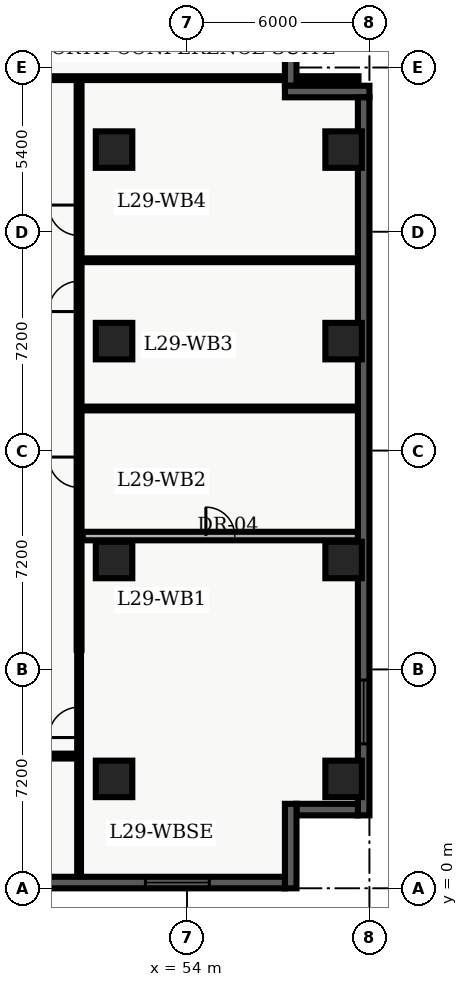
"""IFC4 building model, lengths in metres.
Left out: names, types, materials, properties, quantities, classifications, styles, units other than length and angle.
Written with IfcOpenShell. Run it as: python <this file> out.ifc"""

import sys

from ifc_helpers import new_model, entity, si_unit, converted_unit, direction, frame, origin_with_axes, origin_2d_with_axis, place, context, subcontext, project, spatial, polyline, rectangle, outline, extrude, element, fill, save


model = new_model("IFC4")
c1 = context("Model", 3, precision=1e-05, world=origin_with_axes(), true_north=direction((0.0, 1.0)))
c2 = subcontext(c1, "Body", "Model", "MODEL_VIEW")
j1 = project(units=[si_unit("LENGTHUNIT", "METRE"), converted_unit("PLANEANGLEUNIT", "DEGREE", entity("IfcPlaneAngleMeasure", 0.017), si_unit("PLANEANGLEUNIT", "RADIAN"), dimensions=[0, 0, 0, 0, 0, 0, 0])], contexts=[c1])
p1 = place(None, origin_with_axes())
s1 = spatial("IfcSite", under=j1, at=p1, CompositionType="ELEMENT")
p2 = place(p1, origin_with_axes())
s2 = spatial("IfcBuilding", under=s1, at=p2, CompositionType="ELEMENT")
p3 = place(p2, frame((0.0, 0.0, 120.3), z_axis=(0.0, 0.0, 1.0), x_axis=(1.0, 0.0, 0.0)))
s3 = spatial("IfcBuildingStorey", under=s2, at=p3, CompositionType="ELEMENT", Elevation=120.3)
for number, where, z_axis, x_axis in (
    (1, (51.6, 3.6, 0.0), (0.0, 0.0, 1.0), (1.0, 0.0, 0.0)),
    (2, (51.6, 10.8, 0.0), (0.0, 0.0, 1.0), (1.0, 0.0, 0.0)),
    (3, (51.6, 18.0, 0.0), (0.0, 0.0, 1.0), (1.0, 0.0, 0.0)),
    (4, (51.6, 24.3, 0.0), (0.0, 0.0, 1.0), (1.0, 0.0, 0.0)),
    (5, (59.15, 3.6, 0.0), (0.0, 0.0, 1.0), (1.0, 0.0, 0.0)),
    (6, (59.15, 10.8, 0.0), (0.0, 0.0, 1.0), (1.0, 0.0, 0.0)),
    (7, (59.15, 18.0, 0.0), (0.0, 0.0, 1.0), (1.0, 0.0, 0.0)),
    (8, (59.15, 24.3, 0.0), (0.0, 0.0, 1.0), (1.0, 0.0, 0.0)),
):
    element("IfcColumn", number, at=place(p3, frame(where, z_axis=z_axis, x_axis=x_axis)), inside=s3, PredefinedType="COLUMN", context=c2, shape_type="SweptSolid", body=[
        extrude(rectangle(XDim=1.2, YDim=1.2, at=origin_2d_with_axis()), origin_with_axes(), (0.0, 0.0, 1.0), 3.9),
    ])
p4 = place(p3, frame((50.45, 7.85, 0.0), z_axis=(0.0, 0.0, 1.0), x_axis=(0.0, 1.0, 0.0)))
e9 = element("IfcWall", 9, at=p4, inside=s3, PredefinedType="PARTITIONING", context=c2, shape_type="SweptSolid", body=[
    extrude(outline(polyline([(0.0, -0.08), (18.8, -0.08), (18.8, 0.08), (0.0, 0.08), (0.0, -0.08)])), origin_with_axes(), (0.0, 0.0, 1.0), 2.64),
])
p5 = place(p4, frame((5.836, 0.0, 0.0), z_axis=(0.0, 0.0, 1.0), x_axis=(1.0, 0.0, 0.0)))
e10 = element("IfcOpeningElement", 10, at=p5, cuts=e9, PredefinedType="OPENING", context=c2, shape_type="SweptSolid", body=[
    extrude(rectangle(XDim=1.0, YDim=0.18, at=origin_2d_with_axis()), origin_with_axes(), (0.0, 0.0, 1.0), 2.15),
])
p6 = place(p4, frame((11.622, 0.0, 0.0), z_axis=(0.0, 0.0, 1.0), x_axis=(1.0, 0.0, 0.0)))
e11 = element("IfcOpeningElement", 11, at=p6, cuts=e9, PredefinedType="OPENING", context=c2, shape_type="SweptSolid", body=[
    extrude(rectangle(XDim=1.0, YDim=0.18, at=origin_2d_with_axis()), origin_with_axes(), (0.0, 0.0, 1.0), 2.15),
])
p7 = place(p4, frame((14.125, 0.0, 0.0), z_axis=(0.0, 0.0, 1.0), x_axis=(1.0, 0.0, 0.0)))
e12 = element("IfcOpeningElement", 12, at=p7, cuts=e9, PredefinedType="OPENING", context=c2, shape_type="SweptSolid", body=[
    extrude(rectangle(XDim=1.0, YDim=0.18, at=origin_2d_with_axis()), origin_with_axes(), (0.0, 0.0, 1.0), 2.15),
])
p8 = place(p3, frame((38.76, 26.65, 0.0), z_axis=(0.0, 0.0, 1.0), x_axis=(1.0, 0.0, 0.0)))
e13 = element("IfcWall", 13, at=p8, inside=s3, PredefinedType="PARTITIONING", context=c2, shape_type="SweptSolid", body=[
    extrude(outline(polyline([(0.0, -0.062), (20.88, -0.062), (20.88, 0.062), (0.0, 0.062), (0.0, -0.062)])), origin_with_axes(), (0.0, 0.0, 1.0), 2.64),
])
p9 = place(p8, frame((4.24, 0.0, 0.0), z_axis=(0.0, 0.0, 1.0), x_axis=(1.0, 0.0, 0.0)))
e14 = element("IfcOpeningElement", 14, at=p9, cuts=e13, PredefinedType="OPENING", context=c2, shape_type="SweptSolid", body=[
    extrude(rectangle(XDim=1.0, YDim=0.145, at=origin_2d_with_axis()), origin_with_axes(), (0.0, 0.0, 1.0), 2.15),
])
p10 = place(p3, frame((44.55, 4.35, 0.0), z_axis=(0.0, 0.0, 1.0), x_axis=(1.0, 0.0, 0.0)))
e15 = element("IfcWall", 15, at=p10, inside=s3, PredefinedType="PARTITIONING", context=c2, shape_type="SweptSolid", body=[
    extrude(outline(polyline([(0.0, -0.08), (5.9, -0.08), (5.9, 0.08), (0.0, 0.08), (0.0, -0.08)])), origin_with_axes(), (0.0, 0.0, 1.0), 2.64),
])
p11 = place(p10, frame((1.7, 0.0, 0.0), z_axis=(0.0, 0.0, 1.0), x_axis=(1.0, 0.0, 0.0)))
e16 = element("IfcOpeningElement", 16, at=p11, cuts=e15, PredefinedType="OPENING", context=c2, shape_type="SweptSolid", body=[
    extrude(rectangle(XDim=1.0, YDim=0.18, at=origin_2d_with_axis()), origin_with_axes(), (0.0, 0.0, 1.0), 2.15),
])
p12 = place(p3, frame((50.45, 0.36, 0.0), z_axis=(0.0, 0.0, 1.0), x_axis=(0.0, 1.0, 0.0)))
e17 = element("IfcWall", 17, at=p12, inside=s3, PredefinedType="PARTITIONING", context=c2, shape_type="SweptSolid", body=[
    extrude(outline(polyline([(0.0, -0.062), (7.49, -0.062), (7.49, 0.062), (0.0, 0.062), (0.0, -0.062)])), origin_with_axes(), (0.0, 0.0, 1.0), 2.64),
])
p13 = place(p12, frame((5.1, 0.0, 0.0), z_axis=(0.0, 0.0, 1.0), x_axis=(1.0, 0.0, 0.0)))
e18 = element("IfcOpeningElement", 18, at=p13, cuts=e17, PredefinedType="OPENING", context=c2, shape_type="SweptSolid", body=[
    extrude(rectangle(XDim=1.0, YDim=0.145, at=origin_2d_with_axis()), origin_with_axes(), (0.0, 0.0, 1.0), 2.15),
])
p14 = place(p3, frame((50.57, 11.588, 0.0), z_axis=(0.0, 0.0, 1.0), x_axis=(1.0, 0.0, 0.0)))
e19 = element("IfcWall", 19, at=p14, inside=s3, PredefinedType="PARTITIONING", context=c2, shape_type="SweptSolid", body=[
    extrude(outline(polyline([(0.0, -0.14), (9.055, -0.14), (9.055, 0.14), (0.0, 0.14), (0.0, -0.14)])), origin_with_axes(), (0.0, 0.0, 1.0), 2.64),
])
p15 = place(p14, frame((4.525, 0.0, 0.0), z_axis=(0.0, 0.0, 1.0), x_axis=(1.0, 0.0, 0.0)))
e20 = element("IfcOpeningElement", 20, at=p15, cuts=e19, PredefinedType="OPENING", context=c2, shape_type="SweptSolid", body=[
    extrude(rectangle(XDim=0.95, YDim=0.3, at=origin_2d_with_axis()), origin_with_axes(), (0.0, 0.0, 1.0), 2.15),
])
for number, where, z_axis, x_axis in (
    (21, (50.57, 15.784, 0.0), (0.0, 0.0, 1.0), (1.0, 0.0, 0.0)),
    (22, (50.57, 20.66, 0.0), (0.0, 0.0, 1.0), (1.0, 0.0, 0.0)),
):
    element("IfcWall", number, at=place(p3, frame(where, z_axis=z_axis, x_axis=x_axis)), inside=s3, PredefinedType="PARTITIONING", context=c2, shape_type="SweptSolid", body=[
        extrude(outline(polyline([(0.0, -0.062), (9.055, -0.062), (9.055, 0.062), (0.0, 0.062), (0.0, -0.062)])), origin_with_axes(), (0.0, 0.0, 1.0), 2.64),
    ])
p16 = place(p3, frame((57.41, 28.42, 0.0), z_axis=(0.0, 0.0, 1.0), x_axis=(0.0, -1.0, 0.0)))
e23 = element("IfcWall", 23, at=p16, inside=s3, PredefinedType="SOLIDWALL", context=c2, shape_type="SweptSolid", body=[
    extrude(outline(polyline([(0.0, -0.19), (2.02, -0.19), (2.02, 0.19), (0.0, 0.19), (0.0, -0.19)])), origin_with_axes(), (0.0, 0.0, 1.0), 3.6),
])
p17 = place(p3, frame((57.22, 26.21, 0.0), z_axis=(0.0, 0.0, 1.0), x_axis=(1.0, 0.0, 0.0)))
e24 = element("IfcWall", 24, at=p17, inside=s3, PredefinedType="SOLIDWALL", context=c2, shape_type="SweptSolid", body=[
    extrude(outline(polyline([(0.0, -0.19), (2.78, -0.19), (2.78, 0.19), (0.0, 0.19), (0.0, -0.19)])), origin_with_axes(), (0.0, 0.0, 1.0), 3.6),
])
p18 = place(p3, frame((59.81, 26.02, 0.0), z_axis=(0.0, 0.0, 1.0), x_axis=(0.0, -1.0, 0.0)))
e25 = element("IfcWall", 25, at=p18, inside=s3, PredefinedType="SOLIDWALL", context=c2, shape_type="SweptSolid", body=[
    extrude(outline(polyline([(0.0, -0.19), (23.62, -0.19), (23.62, 0.19), (0.0, 0.19), (0.0, -0.19)])), origin_with_axes(), (0.0, 0.0, 1.0), 3.6),
])
p19 = place(p18, frame((20.218, 0.0, 0.45), z_axis=(0.0, 0.0, 1.0), x_axis=(1.0, 0.0, 0.0)))
e26 = element("IfcOpeningElement", 26, at=p19, cuts=e25, PredefinedType="OPENING", context=c2, shape_type="SweptSolid", body=[
    extrude(rectangle(XDim=2.1, YDim=0.4, at=origin_2d_with_axis()), origin_with_axes(), (0.0, 0.0, 1.0), 2.2),
])
p20 = place(p3, frame((59.62, 2.59, 0.0), z_axis=(0.0, 0.0, 1.0), x_axis=(-1.0, 0.0, 0.0)))
e27 = element("IfcWall", 27, at=p20, inside=s3, PredefinedType="SOLIDWALL", context=c2, shape_type="SweptSolid", body=[
    extrude(outline(polyline([(0.0, -0.19), (2.02, -0.19), (2.02, 0.19), (0.0, 0.19), (0.0, -0.19)])), origin_with_axes(), (0.0, 0.0, 1.0), 3.6),
])
p21 = place(p3, frame((57.41, 2.78, 0.0), z_axis=(0.0, 0.0, 1.0), x_axis=(0.0, -1.0, 0.0)))
e28 = element("IfcWall", 28, at=p21, inside=s3, PredefinedType="SOLIDWALL", context=c2, shape_type="SweptSolid", body=[
    extrude(outline(polyline([(0.0, -0.19), (2.78, -0.19), (2.78, 0.19), (0.0, 0.19), (0.0, -0.19)])), origin_with_axes(), (0.0, 0.0, 1.0), 3.6),
])
p22 = place(p3, frame((57.22, 0.19, 0.0), z_axis=(0.0, 0.0, 1.0), x_axis=(-1.0, 0.0, 0.0)))
e29 = element("IfcWall", 29, at=p22, inside=s3, PredefinedType="SOLIDWALL", context=c2, shape_type="SweptSolid", body=[
    extrude(outline(polyline([(0.0, -0.19), (18.82, -0.19), (18.82, 0.19), (0.0, 0.19), (0.0, -0.19)])), origin_with_axes(), (0.0, 0.0, 1.0), 3.6),
])
p23 = place(p22, frame((3.537, 0.0, 0.45), z_axis=(0.0, 0.0, 1.0), x_axis=(1.0, 0.0, 0.0)))
e30 = element("IfcOpeningElement", 30, at=p23, cuts=e29, PredefinedType="OPENING", context=c2, shape_type="SweptSolid", body=[
    extrude(rectangle(XDim=2.1, YDim=0.4, at=origin_2d_with_axis()), origin_with_axes(), (0.0, 0.0, 1.0), 2.2),
])
p24 = place(p22, frame((9.41, 0.0, 0.45), z_axis=(0.0, 0.0, 1.0), x_axis=(1.0, 0.0, 0.0)))
e31 = element("IfcOpeningElement", 31, at=p24, cuts=e29, PredefinedType="OPENING", context=c2, shape_type="SweptSolid", body=[
    extrude(rectangle(XDim=2.1, YDim=0.4, at=origin_2d_with_axis()), origin_with_axes(), (0.0, 0.0, 1.0), 2.2),
])
p25 = place(p22, frame((15.283, 0.0, 0.45), z_axis=(0.0, 0.0, 1.0), x_axis=(1.0, 0.0, 0.0)))
e32 = element("IfcOpeningElement", 32, at=p25, cuts=e29, PredefinedType="OPENING", context=c2, shape_type="SweptSolid", body=[
    extrude(rectangle(XDim=2.1, YDim=0.4, at=origin_2d_with_axis()), origin_with_axes(), (0.0, 0.0, 1.0), 2.2),
])
p26 = place(p12, frame((5.1, 0.0, 0.0), z_axis=(0.0, 0.0, 1.0), x_axis=(1.0, 0.0, 0.0)))
e33 = element("IfcDoor", 33, at=p26, inside=s3, OperationType="SINGLE_SWING_LEFT", PredefinedType="DOOR", context=c2, shape_type="SweptSolid", body=[
    extrude(rectangle(XDim=1.0, YDim=0.075, at=origin_2d_with_axis()), origin_with_axes(), (0.0, 0.0, 1.0), 2.15),
])
fill(e18, e33)
p27 = place(p14, frame((4.525, 0.0, 0.0), z_axis=(0.0, 0.0, 1.0), x_axis=(1.0, 0.0, 0.0)))
e34 = element("IfcDoor", 34, at=p27, inside=s3, OperationType="SINGLE_SWING_LEFT", PredefinedType="DOOR", context=c2, shape_type="SweptSolid", body=[
    extrude(rectangle(XDim=0.95, YDim=0.09, at=origin_2d_with_axis()), origin_with_axes(), (0.0, 0.0, 1.0), 2.15),
])
fill(e20, e34)
p28 = place(p4, frame((5.836, 0.0, 0.0), z_axis=(0.0, 0.0, 1.0), x_axis=(1.0, 0.0, 0.0)))
e35 = element("IfcDoor", 35, at=p28, inside=s3, OperationType="SINGLE_SWING_RIGHT", PredefinedType="DOOR", context=c2, shape_type="SweptSolid", body=[
    extrude(rectangle(XDim=1.0, YDim=0.09, at=origin_2d_with_axis()), origin_with_axes(), (0.0, 0.0, 1.0), 2.15),
])
fill(e10, e35)
p29 = place(p4, frame((11.622, 0.0, 0.0), z_axis=(0.0, 0.0, 1.0), x_axis=(1.0, 0.0, 0.0)))
e36 = element("IfcDoor", 36, at=p29, inside=s3, OperationType="SINGLE_SWING_LEFT", PredefinedType="DOOR", context=c2, shape_type="SweptSolid", body=[
    extrude(rectangle(XDim=1.0, YDim=0.09, at=origin_2d_with_axis()), origin_with_axes(), (0.0, 0.0, 1.0), 2.15),
])
fill(e11, e36)
p30 = place(p4, frame((14.125, 0.0, 0.0), z_axis=(0.0, 0.0, 1.0), x_axis=(1.0, 0.0, 0.0)))
e37 = element("IfcDoor", 37, at=p30, inside=s3, OperationType="SINGLE_SWING_RIGHT", PredefinedType="DOOR", context=c2, shape_type="SweptSolid", body=[
    extrude(rectangle(XDim=1.0, YDim=0.09, at=origin_2d_with_axis()), origin_with_axes(), (0.0, 0.0, 1.0), 2.15),
])
fill(e12, e37)
p31 = place(p18, frame((20.218, 0.0, 0.45), z_axis=(0.0, 0.0, 1.0), x_axis=(1.0, 0.0, 0.0)))
e38 = element("IfcWindow", 38, at=p31, inside=s3, PredefinedType="WINDOW", context=c2, shape_type="SweptSolid", body=[
    extrude(rectangle(XDim=2.1, YDim=0.09, at=origin_2d_with_axis()), origin_with_axes(), (0.0, 0.0, 1.0), 2.2),
])
fill(e26, e38)
p32 = place(p22, frame((3.537, 0.0, 0.45), z_axis=(0.0, 0.0, 1.0), x_axis=(1.0, 0.0, 0.0)))
e39 = element("IfcWindow", 39, at=p32, inside=s3, PredefinedType="WINDOW", context=c2, shape_type="SweptSolid", body=[
    extrude(rectangle(XDim=2.1, YDim=0.09, at=origin_2d_with_axis()), origin_with_axes(), (0.0, 0.0, 1.0), 2.2),
])
fill(e30, e39)
save(model, sys.argv[1])
